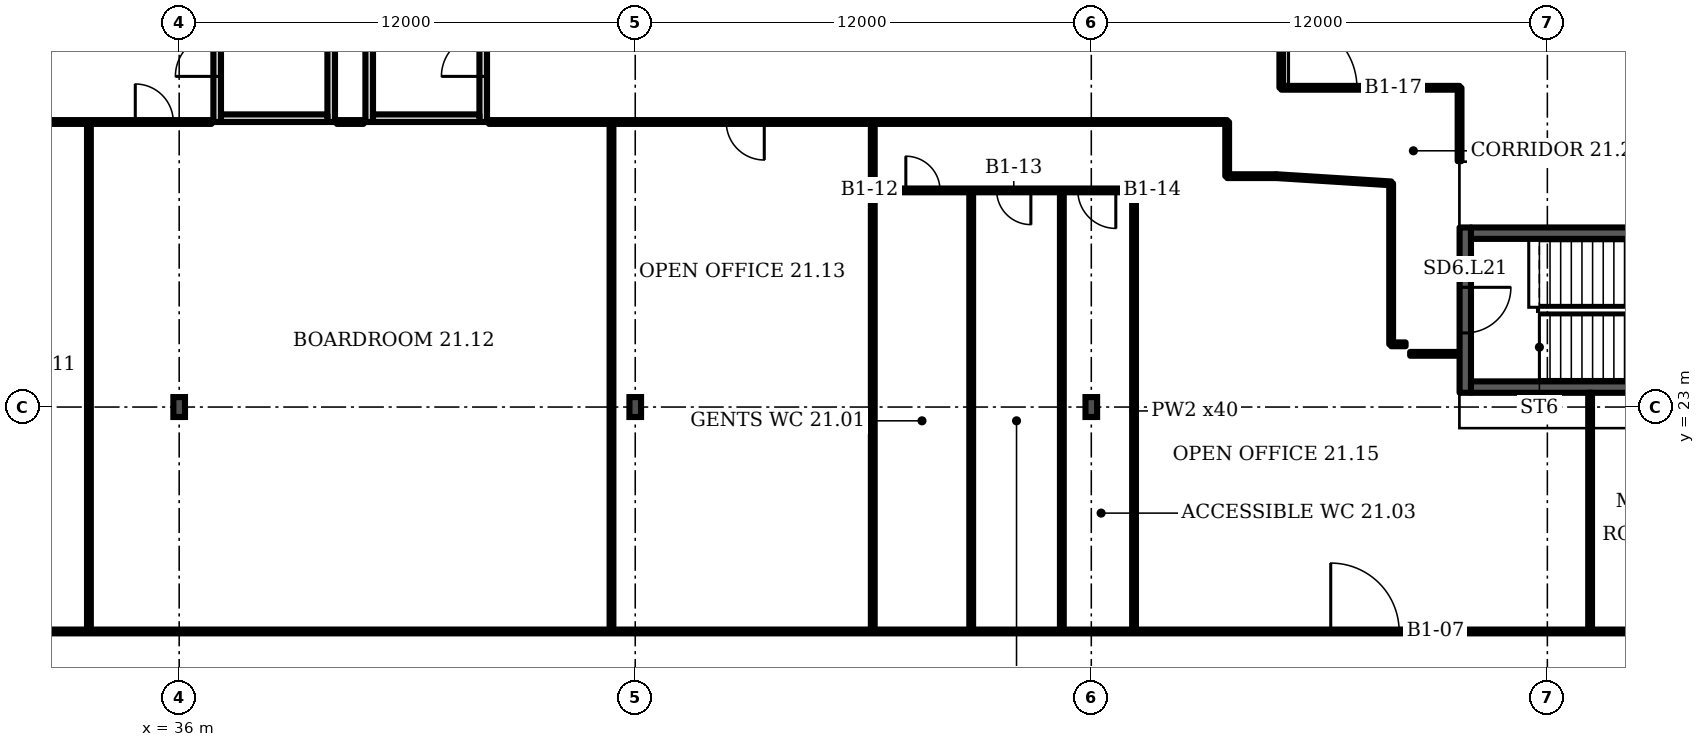
"""IFC4 building model, lengths in metres.
Left out: names, types, materials, properties, quantities, classifications, styles, units other than length and angle.
Written with IfcOpenShell. Run it as: python <this file> out.ifc"""

import sys

from ifc_helpers import new_model, si_unit, direction, frame, frame_2d, origin, origin_2d, place, context, subcontext, project, spatial, rectangle, i_section, extrude, element, fill, save


model = new_model("IFC4")
c1 = context("Model", 3, precision=1e-05, world=origin(), true_north=direction((0.0, 1.0)))
c2 = subcontext(c1, "Body", "Model", "MODEL_VIEW")
j1 = project(units=[si_unit("LENGTHUNIT", "METRE"), si_unit("PLANEANGLEUNIT", "RADIAN")], contexts=[c1])
p1 = place(None, origin())
s1 = spatial("IfcSite", under=j1, at=p1, CompositionType="ELEMENT")
p2 = place(p1, origin())
s2 = spatial("IfcBuilding", under=s1, at=p2, CompositionType="ELEMENT")
p3 = place(p2, frame((0.0, 0.0, 96.7)))
s3 = spatial("IfcBuildingStorey", under=s2, at=p3, CompositionType="ELEMENT", Elevation=96.7)
for number, where, z_axis, x_axis in (
    (1, (36.0, 23.0, 0.0), (0.0, 0.0, 1.0), (1.0, 0.0, 0.0)),
    (2, (48.0, 23.0, 0.0), (0.0, 0.0, 1.0), (1.0, 0.0, 0.0)),
    (3, (60.0, 23.0, 0.0), (0.0, 0.0, 1.0), (1.0, 0.0, 0.0)),
):
    element("IfcColumn", number, at=place(p3, frame(where, z_axis=z_axis, x_axis=x_axis)), inside=s3, PredefinedType="COLUMN", context=c2, shape_type="SweptSolid", body=[
        extrude(i_section(OverallWidth=0.306, OverallDepth=0.524, WebThickness=0.021, FlangeThickness=0.04, FilletRadius=0.027, at=origin_2d()), origin(), (0.0, 0.0, 1.0), 3.6),
    ])
p4 = place(p3, frame((37.0, 30.5, 0.0), z_axis=(0.0, 0.0, 1.0), x_axis=(0.0, 1.0, 0.0)))
e4 = element("IfcWall", 4, at=p4, inside=s3, PredefinedType="PARTITIONING", context=c2, shape_type="SweptSolid", body=[
    extrude(rectangle(XDim=3.5, YDim=0.2, at=frame_2d((1.75, 0.0))), origin(), (0.0, 0.0, 1.0), 3.2),
])
p5 = place(p4, frame((1.2, 0.0, 0.0)))
e5 = element("IfcOpeningElement", 5, at=p5, cuts=e4, PredefinedType="OPENING", context=c2, shape_type="SweptSolid", body=[
    extrude(rectangle(XDim=1.1, YDim=2.1, at=frame_2d((0.55, 1.05))), frame((0.0, 0.11, 0.0), z_axis=(0.0, -1.0, 0.0), x_axis=(1.0, 0.0, 0.0)), (0.0, 0.0, 1.0), 0.22),
])
p6 = place(p3, frame((40.0, 30.5, 0.0), z_axis=(0.0, 0.0, 1.0), x_axis=(0.0, 1.0, 0.0)))
e6 = element("IfcWall", 6, at=p6, inside=s3, PredefinedType="PARTITIONING", context=c2, shape_type="SweptSolid", body=[
    extrude(rectangle(XDim=3.5, YDim=0.2, at=frame_2d((1.75, 0.0))), origin(), (0.0, 0.0, 1.0), 3.2),
])
p7 = place(p3, frame((37.1, 30.6, 0.0), z_axis=(0.0, 0.0, 1.0), x_axis=(1.0, 0.0, 0.0)))
e7 = element("IfcWall", 7, at=p7, inside=s3, PredefinedType="PARTITIONING", context=c2, shape_type="SweptSolid", body=[
    extrude(rectangle(XDim=2.8, YDim=0.2, at=frame_2d((1.4, 0.0))), origin(), (0.0, 0.0, 1.0), 3.2),
])
p8 = place(p3, frame((41.0, 30.5, 0.0), z_axis=(0.0, 0.0, 1.0), x_axis=(0.0, 1.0, 0.0)))
e8 = element("IfcWall", 8, at=p8, inside=s3, PredefinedType="PARTITIONING", context=c2, shape_type="SweptSolid", body=[
    extrude(rectangle(XDim=3.5, YDim=0.2, at=frame_2d((1.75, 0.0))), origin(), (0.0, 0.0, 1.0), 3.2),
])
p9 = place(p3, frame((44.0, 30.5, 0.0), z_axis=(0.0, 0.0, 1.0), x_axis=(0.0, 1.0, 0.0)))
e9 = element("IfcWall", 9, at=p9, inside=s3, PredefinedType="PARTITIONING", context=c2, shape_type="SweptSolid", body=[
    extrude(rectangle(XDim=3.5, YDim=0.2, at=frame_2d((1.75, 0.0))), origin(), (0.0, 0.0, 1.0), 3.2),
])
p10 = place(p9, frame((1.2, 0.0, 0.0)))
e10 = element("IfcOpeningElement", 10, at=p10, cuts=e9, PredefinedType="OPENING", context=c2, shape_type="SweptSolid", body=[
    extrude(rectangle(XDim=1.1, YDim=2.1, at=frame_2d((0.55, 1.05))), frame((0.0, 0.11, 0.0), z_axis=(0.0, -1.0, 0.0), x_axis=(1.0, 0.0, 0.0)), (0.0, 0.0, 1.0), 0.22),
])
p11 = place(p3, frame((41.1, 30.6, 0.0), z_axis=(0.0, 0.0, 1.0), x_axis=(1.0, 0.0, 0.0)))
e11 = element("IfcWall", 11, at=p11, inside=s3, PredefinedType="PARTITIONING", context=c2, shape_type="SweptSolid", body=[
    extrude(rectangle(XDim=2.8, YDim=0.2, at=frame_2d((1.4, 0.0))), origin(), (0.0, 0.0, 1.0), 3.2),
])
p12 = place(p3, frame((69.84, 23.375, 0.0), z_axis=(0.0, 0.0, 1.0), x_axis=(0.0, 1.0, 0.0)))
e12 = element("IfcWall", 12, at=p12, inside=s3, PredefinedType="SHEAR", context=c2, shape_type="SweptSolid", body=[
    extrude(rectangle(XDim=4.35, YDim=0.3, at=frame_2d((2.175, 0.0))), origin(), (0.0, 0.0, 1.0), 3.2),
])
p13 = place(p12, frame((1.575, 0.0, 0.0)))
e13 = element("IfcOpeningElement", 13, at=p13, cuts=e12, PredefinedType="OPENING", context=c2, shape_type="SweptSolid", body=[
    extrude(rectangle(XDim=1.2, YDim=2.1, at=frame_2d((0.6, 1.05))), frame((0.0, 0.16, 0.0), z_axis=(0.0, -1.0, 0.0), x_axis=(1.0, 0.0, 0.0)), (0.0, 0.0, 1.0), 0.32),
])
p14 = place(p3, frame((17.8, 17.095, 0.0), z_axis=(0.0, 0.0, 1.0), x_axis=(1.0, 0.0, 0.0)))
e14 = element("IfcWall", 14, at=p14, inside=s3, PredefinedType="PARTITIONING", context=c2, shape_type="SweptSolid", body=[
    extrude(rectangle(XDim=67.8, YDim=0.1, at=frame_2d((33.9, 0.0))), origin(), (0.0, 0.0, 1.0), 3.2),
])
p15 = place(p14, frame((12.0, 0.0, 0.0)))
e15 = element("IfcOpeningElement", 15, at=p15, cuts=e14, PredefinedType="OPENING", context=c2, shape_type="SweptSolid", body=[
    extrude(rectangle(XDim=1.0, YDim=2.1, at=frame_2d((0.5, 1.05))), frame((0.0, 0.06, 0.0), z_axis=(0.0, -1.0, 0.0), x_axis=(1.0, 0.0, 0.0)), (0.0, 0.0, 1.0), 0.12),
])
p16 = place(p14, frame((48.5, 0.0, 0.0)))
e16 = element("IfcOpeningElement", 16, at=p16, cuts=e14, PredefinedType="OPENING", context=c2, shape_type="SweptSolid", body=[
    extrude(rectangle(XDim=1.8, YDim=2.1, at=frame_2d((0.9, 1.05))), frame((0.0, 0.06, 0.0), z_axis=(0.0, -1.0, 0.0), x_axis=(1.0, 0.0, 0.0)), (0.0, 0.0, 1.0), 0.12),
])
p17 = place(p14, frame((56.825, 0.0, 0.0)))
e17 = element("IfcOpeningElement", 17, at=p17, cuts=e14, PredefinedType="OPENING", context=c2, shape_type="SweptSolid", body=[
    extrude(rectangle(XDim=1.0, YDim=2.1, at=frame_2d((0.5, 1.05))), frame((0.0, 0.06, 0.0), z_axis=(0.0, -1.0, 0.0), x_axis=(1.0, 0.0, 0.0)), (0.0, 0.0, 1.0), 0.12),
])
p18 = place(p14, frame((60.825, 0.0, 0.0)))
e18 = element("IfcOpeningElement", 18, at=p18, cuts=e14, PredefinedType="OPENING", context=c2, shape_type="SweptSolid", body=[
    extrude(rectangle(XDim=1.0, YDim=2.1, at=frame_2d((0.5, 1.05))), frame((0.0, 0.06, 0.0), z_axis=(0.0, -1.0, 0.0), x_axis=(1.0, 0.0, 0.0)), (0.0, 0.0, 1.0), 0.12),
])
p19 = place(p14, frame((64.981, 0.0, 0.0)))
e19 = element("IfcOpeningElement", 19, at=p19, cuts=e14, PredefinedType="OPENING", context=c2, shape_type="SweptSolid", body=[
    extrude(rectangle(XDim=1.0, YDim=2.1, at=frame_2d((0.5, 1.05))), frame((0.0, 0.06, 0.0), z_axis=(0.0, -1.0, 0.0), x_axis=(1.0, 0.0, 0.0)), (0.0, 0.0, 1.0), 0.12),
])
p20 = place(p3, frame((18.455, 30.5, 0.0), z_axis=(0.0, 0.0, 1.0), x_axis=(1.0, 0.0, 0.0)))
e20 = element("IfcWall", 20, at=p20, inside=s3, PredefinedType="PARTITIONING", context=c2, shape_type="SweptSolid", body=[
    extrude(rectangle(XDim=18.395, YDim=0.1, at=frame_2d((9.198, 0.0))), origin(), (0.0, 0.0, 1.0), 3.2),
])
p21 = place(p20, frame((16.39, 0.0, 0.0)))
e21 = element("IfcOpeningElement", 21, at=p21, cuts=e20, PredefinedType="OPENING", context=c2, shape_type="SweptSolid", body=[
    extrude(rectangle(XDim=1.0, YDim=2.1, at=frame_2d((0.5, 1.05))), frame((0.0, 0.06, 0.0), z_axis=(0.0, -1.0, 0.0), x_axis=(1.0, 0.0, 0.0)), (0.0, 0.0, 1.0), 0.12),
])
for number, where, z_axis, x_axis in (
    (22, (33.625, 17.095, 0.0), (0.0, 0.0, 1.0), (0.0, 1.0, 0.0)),
    (23, (47.375, 17.095, 0.0), (0.0, 0.0, 1.0), (0.0, 1.0, 0.0)),
):
    element("IfcWall", number, at=place(p3, frame(where, z_axis=z_axis, x_axis=x_axis)), inside=s3, PredefinedType="PARTITIONING", context=c2, shape_type="SweptSolid", body=[
        extrude(rectangle(XDim=13.405, YDim=0.1, at=frame_2d((6.703, 0.0))), origin(), (0.0, 0.0, 1.0), 3.2),
    ])
p22 = place(p3, frame((54.25, 17.095, 0.0), z_axis=(0.0, 0.0, 1.0), x_axis=(0.0, 1.0, 0.0)))
e24 = element("IfcWall", 24, at=p22, inside=s3, PredefinedType="PARTITIONING", context=c2, shape_type="SweptSolid", body=[
    extrude(rectangle(XDim=13.395, YDim=0.1, at=frame_2d((6.698, 0.0))), origin(), (0.0, 0.0, 1.0), 3.2),
])
p23 = place(p3, frame((54.25, 28.7, 0.0), z_axis=(0.0, 0.0, 1.0), x_axis=(1.0, 0.0, 0.0)))
e25 = element("IfcWall", 25, at=p23, inside=s3, PredefinedType="PARTITIONING", context=c2, shape_type="SweptSolid", body=[
    extrude(rectangle(XDim=6.875, YDim=0.1, at=frame_2d((3.438, 0.0))), origin(), (0.0, 0.0, 1.0), 3.2),
])
p24 = place(p23, frame((0.87, 0.0, 0.0)))
e26 = element("IfcOpeningElement", 26, at=p24, cuts=e25, PredefinedType="OPENING", context=c2, shape_type="SweptSolid", body=[
    extrude(rectangle(XDim=0.9, YDim=2.1, at=frame_2d((0.45, 1.05))), frame((0.0, 0.06, 0.0), z_axis=(0.0, -1.0, 0.0), x_axis=(1.0, 0.0, 0.0)), (0.0, 0.0, 1.0), 0.12),
])
p25 = place(p23, frame((3.26, 0.0, 0.0)))
e27 = element("IfcOpeningElement", 27, at=p25, cuts=e25, PredefinedType="OPENING", context=c2, shape_type="SweptSolid", body=[
    extrude(rectangle(XDim=0.9, YDim=2.1, at=frame_2d((0.45, 1.05))), frame((0.0, 0.06, 0.0), z_axis=(0.0, -1.0, 0.0), x_axis=(1.0, 0.0, 0.0)), (0.0, 0.0, 1.0), 0.12),
])
p26 = place(p23, frame((5.395, 0.0, 0.0)))
e28 = element("IfcOpeningElement", 28, at=p26, cuts=e25, PredefinedType="OPENING", context=c2, shape_type="SweptSolid", body=[
    extrude(rectangle(XDim=1.0, YDim=2.1, at=frame_2d((0.5, 1.05))), frame((0.0, 0.06, 0.0), z_axis=(0.0, -1.0, 0.0), x_axis=(1.0, 0.0, 0.0)), (0.0, 0.0, 1.0), 0.12),
])
for number, where, z_axis, x_axis in (
    (29, (56.84, 17.095, 0.0), (0.0, 0.0, 1.0), (0.0, 1.0, 0.0)),
    (30, (59.225, 17.095, 0.0), (0.0, 0.0, 1.0), (0.0, 1.0, 0.0)),
    (31, (61.125, 17.095, 0.0), (0.0, 0.0, 1.0), (0.0, 1.0, 0.0)),
):
    element("IfcWall", number, at=place(p3, frame(where, z_axis=z_axis, x_axis=x_axis)), inside=s3, PredefinedType="PARTITIONING", context=c2, shape_type="SweptSolid", body=[
        extrude(rectangle(XDim=11.605, YDim=0.1, at=frame_2d((5.802, 0.0))), origin(), (0.0, 0.0, 1.0), 3.2),
    ])
p27 = place(p3, frame((63.575, 29.075, 0.0), z_axis=(0.0, 0.0, 1.0), x_axis=(0.0, 1.0, 0.0)))
e32 = element("IfcWall", 32, at=p27, inside=s3, PredefinedType="PARTITIONING", context=c2, shape_type="SweptSolid", body=[
    extrude(rectangle(XDim=1.425, YDim=0.1, at=frame_2d((0.712, 0.0))), origin(), (0.0, 0.0, 1.0), 3.2),
])
p28 = place(p3, frame((63.575, 29.075, 0.0), z_axis=(0.0, 0.0, 1.0), x_axis=(1.0, 0.0, 0.0)))
e33 = element("IfcWall", 33, at=p28, inside=s3, PredefinedType="PARTITIONING", context=c2, shape_type="SweptSolid", body=[
    extrude(rectangle(XDim=1.285, YDim=0.1, at=frame_2d((0.643, 0.0))), origin(), (0.0, 0.0, 1.0), 3.2),
])
p29 = place(p3, frame((65.0, 31.4, 0.0), z_axis=(0.0, 0.0, 1.0), x_axis=(0.0, 1.0, 0.0)))
e34 = element("IfcWall", 34, at=p29, inside=s3, PredefinedType="PARTITIONING", context=c2, shape_type="SweptSolid", body=[
    extrude(rectangle(XDim=2.58, YDim=0.1, at=frame_2d((1.29, 0.0))), origin(), (0.0, 0.0, 1.0), 3.2),
])
p30 = place(p3, frame((65.0, 31.4, 0.0), z_axis=(0.0, 0.0, 1.0), x_axis=(1.0, 0.0, 0.0)))
e35 = element("IfcWall", 35, at=p30, inside=s3, PredefinedType="PARTITIONING", context=c2, shape_type="SweptSolid", body=[
    extrude(rectangle(XDim=4.69, YDim=0.1, at=frame_2d((2.345, 0.0))), origin(), (0.0, 0.0, 1.0), 3.2),
])
p31 = place(p30, frame((0.19, 0.0, 0.0)))
e36 = element("IfcOpeningElement", 36, at=p31, cuts=e35, PredefinedType="OPENING", context=c2, shape_type="SweptSolid", body=[
    extrude(rectangle(XDim=1.8, YDim=2.1, at=frame_2d((0.9, 1.05))), frame((0.0, 0.06, 0.0), z_axis=(0.0, -1.0, 0.0), x_axis=(1.0, 0.0, 0.0)), (0.0, 0.0, 1.0), 0.12),
])
p32 = place(p3, frame((67.89, 24.65, 0.0), z_axis=(0.0, 0.0, 1.0), x_axis=(0.0, 1.0, 0.0)))
e37 = element("IfcWall", 37, at=p32, inside=s3, PredefinedType="PARTITIONING", context=c2, shape_type="SweptSolid", body=[
    extrude(rectangle(XDim=4.235, YDim=0.1, at=frame_2d((2.118, 0.0))), origin(), (0.0, 0.0, 1.0), 3.2),
])
p33 = place(p3, frame((67.89, 24.65, 0.0), z_axis=(0.0, 0.0, 1.0), x_axis=(1.0, 0.0, 0.0)))
e38 = element("IfcWall", 38, at=p33, inside=s3, PredefinedType="PARTITIONING", context=c2, shape_type="SweptSolid", body=[
    extrude(rectangle(XDim=0.38, YDim=0.1, at=frame_2d((0.19, 0.0))), origin(), (0.0, 0.0, 1.0), 3.2),
])
p34 = place(p3, frame((67.89, 28.885, 0.0), z_axis=(0.0, 0.0, 1.0), x_axis=(-0.998031, 0.062786, 0.0)))
e39 = element("IfcWall", 39, at=p34, inside=s3, PredefinedType="PARTITIONING", context=c2, shape_type="SweptSolid", body=[
    extrude(rectangle(XDim=3.021, YDim=0.1, at=frame_2d((1.511, 0.0))), origin(), (0.0, 0.0, 1.0), 3.2),
])
p35 = place(p3, frame((68.39, 24.4, 0.0), z_axis=(0.0, 0.0, 1.0), x_axis=(1.0, 0.0, 0.0)))
e40 = element("IfcWall", 40, at=p35, inside=s3, PredefinedType="PARTITIONING", context=c2, shape_type="SweptSolid", body=[
    extrude(rectangle(XDim=1.281, YDim=0.1, at=frame_2d((0.64, 0.0))), origin(), (0.0, 0.0, 1.0), 3.2),
])
p36 = place(p3, frame((69.69, 29.47, 0.0), z_axis=(0.0, 0.0, 1.0), x_axis=(0.0, 1.0, 0.0)))
e41 = element("IfcWall", 41, at=p36, inside=s3, PredefinedType="PARTITIONING", context=c2, shape_type="SweptSolid", body=[
    extrude(rectangle(XDim=1.93, YDim=0.1, at=frame_2d((0.965, 0.0))), origin(), (0.0, 0.0, 1.0), 3.2),
])
p37 = place(p3, frame((73.125, 17.095, 0.0), z_axis=(0.0, 0.0, 1.0), x_axis=(0.0, 1.0, 0.0)))
e42 = element("IfcWall", 42, at=p37, inside=s3, PredefinedType="PARTITIONING", context=c2, shape_type="SweptSolid", body=[
    extrude(rectangle(XDim=6.28, YDim=0.1, at=frame_2d((3.14, 0.0))), origin(), (0.0, 0.0, 1.0), 3.2),
])
p38 = place(p3, frame((40.15, 30.5, 0.0), z_axis=(0.0, 0.0, 1.0), x_axis=(1.0, 0.0, 0.0)))
e43 = element("IfcWall", 43, at=p38, inside=s3, PredefinedType="PARTITIONING", context=c2, shape_type="SweptSolid", body=[
    extrude(rectangle(XDim=0.7, YDim=0.1, at=frame_2d((0.35, 0.0))), origin(), (0.0, 0.0, 1.0), 3.2),
])
p39 = place(p3, frame((44.15, 30.5, 0.0), z_axis=(0.0, 0.0, 1.0), x_axis=(1.0, 0.0, 0.0)))
e44 = element("IfcWall", 44, at=p39, inside=s3, PredefinedType="PARTITIONING", context=c2, shape_type="SweptSolid", body=[
    extrude(rectangle(XDim=19.425, YDim=0.1, at=frame_2d((9.712, 0.0))), origin(), (0.0, 0.0, 1.0), 3.2),
])
p40 = place(p39, frame((6.245, 0.0, 0.0)))
e45 = element("IfcOpeningElement", 45, at=p40, cuts=e44, PredefinedType="OPENING", context=c2, shape_type="SweptSolid", body=[
    extrude(rectangle(XDim=1.0, YDim=2.1, at=frame_2d((0.5, 1.05))), frame((0.0, 0.06, 0.0), z_axis=(0.0, -1.0, 0.0), x_axis=(1.0, 0.0, 0.0)), (0.0, 0.0, 1.0), 0.12),
])
for number, where, z_axis, x_axis in (
    (46, (69.99, 23.525, 0.0), (0.0, 0.0, 1.0), (1.0, 0.0, 0.0)),
    (47, (69.99, 27.575, 0.0), (0.0, 0.0, 1.0), (1.0, 0.0, 0.0)),
):
    element("IfcWall", number, at=place(p3, frame(where, z_axis=z_axis, x_axis=x_axis)), inside=s3, PredefinedType="SHEAR", context=c2, shape_type="SweptSolid", body=[
        extrude(rectangle(XDim=7.5, YDim=0.3, at=frame_2d((3.75, 0.0))), origin(), (0.0, 0.0, 1.0), 3.2),
    ])
p41 = place(p5, origin())
e48 = element("IfcDoor", 48, at=p41, inside=s3, OperationType="SINGLE_SWING_LEFT", PredefinedType="DOOR", context=c2, shape_type="SweptSolid", body=[
    extrude(rectangle(XDim=1.1, YDim=2.1, at=frame_2d((0.55, 1.05))), frame((0.0, 0.025, 0.0), z_axis=(0.0, -1.0, 0.0), x_axis=(1.0, 0.0, 0.0)), (0.0, 0.0, 1.0), 0.05),
])
fill(e5, e48)
p42 = place(p10, origin())
e49 = element("IfcDoor", 49, at=p42, inside=s3, OperationType="SINGLE_SWING_LEFT", PredefinedType="DOOR", context=c2, shape_type="SweptSolid", body=[
    extrude(rectangle(XDim=1.1, YDim=2.1, at=frame_2d((0.55, 1.05))), frame((0.0, 0.025, 0.0), z_axis=(0.0, -1.0, 0.0), x_axis=(1.0, 0.0, 0.0)), (0.0, 0.0, 1.0), 0.05),
])
fill(e10, e49)
p43 = place(p13, origin())
e50 = element("IfcDoor", 50, at=p43, inside=s3, OperationType="SINGLE_SWING_RIGHT", PredefinedType="DOOR", context=c2, shape_type="SweptSolid", body=[
    extrude(rectangle(XDim=1.2, YDim=2.1, at=frame_2d((0.6, 1.05))), frame((0.0, 0.025, 0.0), z_axis=(0.0, -1.0, 0.0), x_axis=(1.0, 0.0, 0.0)), (0.0, 0.0, 1.0), 0.05),
])
fill(e13, e50)
p44 = place(p16, origin())
e51 = element("IfcDoor", 51, at=p44, inside=s3, OperationType="DOUBLE_DOOR_SINGLE_SWING", PredefinedType="DOOR", context=c2, shape_type="SweptSolid", body=[
    extrude(rectangle(XDim=1.8, YDim=2.1, at=frame_2d((0.9, 1.05))), frame((0.0, 0.025, 0.0), z_axis=(0.0, -1.0, 0.0), x_axis=(1.0, 0.0, 0.0)), (0.0, 0.0, 1.0), 0.05),
])
fill(e16, e51)
p45 = place(p24, origin())
e52 = element("IfcDoor", 52, at=p45, inside=s3, OperationType="SINGLE_SWING_LEFT", PredefinedType="DOOR", context=c2, shape_type="SweptSolid", body=[
    extrude(rectangle(XDim=0.9, YDim=2.1, at=frame_2d((0.45, 1.05))), frame((0.0, 0.025, 0.0), z_axis=(0.0, -1.0, 0.0), x_axis=(1.0, 0.0, 0.0)), (0.0, 0.0, 1.0), 0.05),
])
fill(e26, e52)
p46 = place(p25, origin())
e53 = element("IfcDoor", 53, at=p46, inside=s3, OperationType="SINGLE_SWING_RIGHT", PredefinedType="DOOR", context=c2, shape_type="SweptSolid", body=[
    extrude(rectangle(XDim=0.9, YDim=2.1, at=frame_2d((0.45, 1.05))), frame((0.0, 0.025, 0.0), z_axis=(0.0, -1.0, 0.0), x_axis=(1.0, 0.0, 0.0)), (0.0, 0.0, 1.0), 0.05),
])
fill(e27, e53)
p47 = place(p26, origin())
e54 = element("IfcDoor", 54, at=p47, inside=s3, OperationType="SINGLE_SWING_RIGHT", PredefinedType="DOOR", context=c2, shape_type="SweptSolid", body=[
    extrude(rectangle(XDim=1.0, YDim=2.1, at=frame_2d((0.5, 1.05))), frame((0.0, 0.025, 0.0), z_axis=(0.0, -1.0, 0.0), x_axis=(1.0, 0.0, 0.0)), (0.0, 0.0, 1.0), 0.05),
])
fill(e28, e54)
p48 = place(p21, origin())
e55 = element("IfcDoor", 55, at=p48, inside=s3, OperationType="SINGLE_SWING_LEFT", PredefinedType="DOOR", context=c2, shape_type="SweptSolid", body=[
    extrude(rectangle(XDim=1.0, YDim=2.1, at=frame_2d((0.5, 1.05))), frame((0.0, 0.025, 0.0), z_axis=(0.0, -1.0, 0.0), x_axis=(1.0, 0.0, 0.0)), (0.0, 0.0, 1.0), 0.05),
])
fill(e21, e55)
p49 = place(p40, origin())
e56 = element("IfcDoor", 56, at=p49, inside=s3, OperationType="SINGLE_SWING_RIGHT", PredefinedType="DOOR", context=c2, shape_type="SweptSolid", body=[
    extrude(rectangle(XDim=1.0, YDim=2.1, at=frame_2d((0.5, 1.05))), frame((0.0, 0.025, 0.0), z_axis=(0.0, -1.0, 0.0), x_axis=(1.0, 0.0, 0.0)), (0.0, 0.0, 1.0), 0.05),
])
fill(e45, e56)
p50 = place(p31, origin())
e57 = element("IfcDoor", 57, at=p50, inside=s3, OperationType="DOUBLE_DOOR_SINGLE_SWING", PredefinedType="DOOR", context=c2, shape_type="SweptSolid", body=[
    extrude(rectangle(XDim=1.8, YDim=2.1, at=frame_2d((0.9, 1.05))), frame((0.0, 0.025, 0.0), z_axis=(0.0, -1.0, 0.0), x_axis=(1.0, 0.0, 0.0)), (0.0, 0.0, 1.0), 0.05),
])
fill(e36, e57)
save(model, sys.argv[1])
